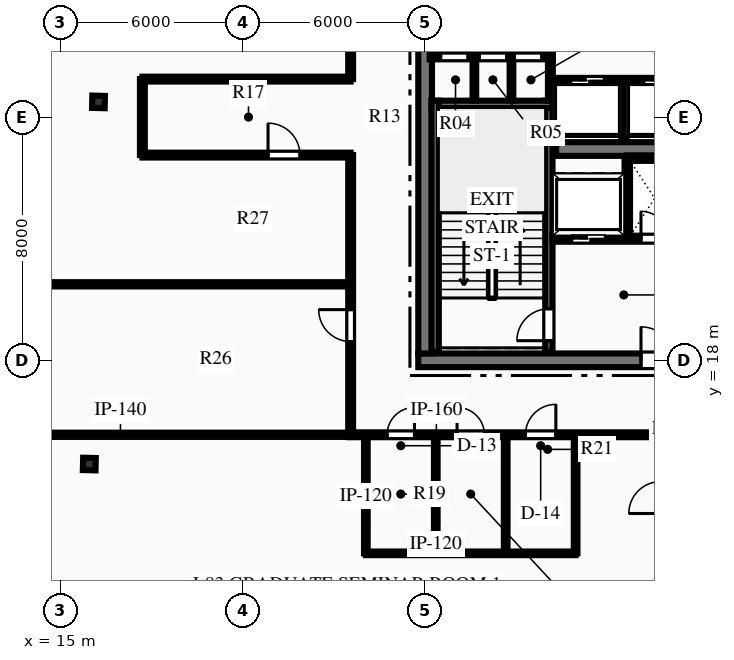
"""IFC4 building model, lengths in metres.
Left out: names, types, materials, properties, quantities, classifications, styles, units other than length and angle.
Written with IfcOpenShell. Run it as: python <this file> out.ifc"""

import sys

from ifc_helpers import new_model, si_unit, direction, frame, frame_2d, origin, origin_2d, place, context, subcontext, project, spatial, rectangle, i_section, extrude, element, fill, save


model = new_model("IFC4")
c1 = context("Model", 3, precision=1e-05, world=origin(), true_north=direction((0.0, 1.0)))
c2 = subcontext(c1, "Body", "Model", "MODEL_VIEW")
j1 = project(units=[si_unit("LENGTHUNIT", "METRE"), si_unit("PLANEANGLEUNIT", "RADIAN")], contexts=[c1])
p1 = place(None, origin())
s1 = spatial("IfcSite", under=j1, at=p1, CompositionType="ELEMENT")
p2 = place(p1, origin())
s2 = spatial("IfcBuilding", under=s1, at=p2, CompositionType="ELEMENT")
p3 = place(p2, frame((0.0, 0.0, 328.95)))
s3 = spatial("IfcBuildingStorey", under=s2, at=p3, CompositionType="ELEMENT", Elevation=328.95)
p4 = place(p3, frame((26.775, 18.0, 0.0), z_axis=(0.0, 0.0, 1.0), x_axis=(1.0, 0.0, 0.0)))
e1 = element("IfcWall", 1, at=p4, inside=s3, PredefinedType="SHEAR", context=c2, shape_type="SweptSolid", body=[
    extrude(rectangle(XDim=18.45, YDim=0.45, at=frame_2d((9.225, 0.0))), origin(), (0.0, 0.0, 1.0), 3.75),
])
p5 = place(p4, frame((7.325, 0.0, 0.0)))
e2 = element("IfcOpeningElement", 2, at=p5, cuts=e1, PredefinedType="OPENING", context=c2, shape_type="SweptSolid", body=[
    extrude(rectangle(XDim=1.1, YDim=2.15, at=frame_2d((0.55, 1.075))), frame((0.0, 0.235, 0.0), z_axis=(0.0, -1.0, 0.0), x_axis=(1.0, 0.0, 0.0)), (0.0, 0.0, 1.0), 0.47),
])
p6 = place(p4, frame((10.025, 0.0, 0.0)))
e3 = element("IfcOpeningElement", 3, at=p6, cuts=e1, PredefinedType="OPENING", context=c2, shape_type="SweptSolid", body=[
    extrude(rectangle(XDim=1.1, YDim=2.15, at=frame_2d((0.55, 1.075))), frame((0.0, 0.235, 0.0), z_axis=(0.0, -1.0, 0.0), x_axis=(1.0, 0.0, 0.0)), (0.0, 0.0, 1.0), 0.47),
])
p7 = place(p3, frame((27.0, 18.225, 0.0), z_axis=(0.0, 0.0, 1.0), x_axis=(0.0, 1.0, 0.0)))
e4 = element("IfcWall", 4, at=p7, inside=s3, PredefinedType="SHEAR", context=c2, shape_type="SweptSolid", body=[
    extrude(rectangle(XDim=15.55, YDim=0.45, at=frame_2d((7.775, 0.0))), origin(), (0.0, 0.0, 1.0), 3.75),
])
p8 = place(p7, frame((10.015, 0.0, 0.0)))
e5 = element("IfcOpeningElement", 5, at=p8, cuts=e4, PredefinedType="OPENING", context=c2, shape_type="SweptSolid", body=[
    extrude(rectangle(XDim=1.4, YDim=2.2, at=frame_2d((0.7, 1.1))), frame((0.0, 0.235, 0.0), z_axis=(0.0, -1.0, 0.0), x_axis=(1.0, 0.0, 0.0)), (0.0, 0.0, 1.0), 0.47),
])
p9 = place(p3, frame((31.31, 24.95, 0.0), z_axis=(0.0, 0.0, 1.0), x_axis=(1.0, 0.0, 0.0)))
e6 = element("IfcWall", 6, at=p9, inside=s3, PredefinedType="SHEAR", context=c2, shape_type="SweptSolid", body=[
    extrude(rectangle(XDim=9.38, YDim=0.45, at=frame_2d((4.69, 0.0))), origin(), (0.0, 0.0, 1.0), 3.75),
])
p10 = place(p3, frame((31.07, 18.28, 0.0), z_axis=(0.0, 0.0, 1.0), x_axis=(0.0, 1.0, 0.0)))
e7 = element("IfcWall", 7, at=p10, inside=s3, PredefinedType="SHEAR", context=c2, shape_type="SweptSolid", body=[
    extrude(rectangle(XDim=8.26, YDim=0.24, at=frame_2d((4.13, 0.0))), origin(), (0.0, 0.0, 1.0), 3.75),
])
p11 = place(p10, frame((0.365, 0.0, 0.0)))
e8 = element("IfcOpeningElement", 8, at=p11, cuts=e7, PredefinedType="OPENING", context=c2, shape_type="SweptSolid", body=[
    extrude(rectangle(XDim=1.05, YDim=2.15, at=frame_2d((0.525, 1.075))), frame((0.0, 0.13, 0.0), z_axis=(0.0, -1.0, 0.0), x_axis=(1.0, 0.0, 0.0)), (0.0, 0.0, 1.0), 0.26),
])
p12 = place(p3, frame((27.21, 26.42, 0.0), z_axis=(0.0, 0.0, 1.0), x_axis=(1.0, 0.0, 0.0)))
e9 = element("IfcWall", 9, at=p12, inside=s3, PredefinedType="SHEAR", context=c2, shape_type="SweptSolid", body=[
    extrude(rectangle(XDim=3.98, YDim=0.24, at=frame_2d((1.99, 0.0))), origin(), (0.0, 0.0, 1.0), 3.75),
])
p13 = place(p3, frame((27.33, 18.28, 0.0), z_axis=(0.0, 0.0, 1.0), x_axis=(0.0, 1.0, 0.0)))
e10 = element("IfcWall", 10, at=p13, inside=s3, PredefinedType="SHEAR", context=c2, shape_type="SweptSolid", body=[
    extrude(rectangle(XDim=8.26, YDim=0.24, at=frame_2d((4.13, 0.0))), origin(), (0.0, 0.0, 1.0), 3.75),
])
for number, where, z_axis, x_axis in (
    (11, (16.256, 26.5, 0.0), (0.0, 0.0, 1.0), (0.025, 1.0, 0.0)),
    (12, (15.955, 14.588, 0.0), (0.0, 0.0, 1.0), (0.025, 1.0, 0.0)),
):
    element("IfcColumn", number, at=place(p3, frame(where, z_axis=z_axis, x_axis=x_axis)), inside=s3, PredefinedType="COLUMN", context=c2, shape_type="SweptSolid", body=[
        extrude(i_section(OverallWidth=0.406, OverallDepth=0.416, WebThickness=0.03, FlangeThickness=0.048, at=origin_2d()), origin(), (0.0, 0.0, 1.0), 3.75),
    ])
p14 = place(p3, frame((31.19, 22.0, 0.0), z_axis=(0.0, 0.0, 1.0), x_axis=(1.0, 0.0, 0.0)))
e13 = element("IfcWall", 13, at=p14, inside=s3, PredefinedType="PARTITIONING", context=c2, shape_type="SweptSolid", body=[
    extrude(rectangle(XDim=4.69, YDim=0.2, at=frame_2d((2.345, 0.0))), origin(), (0.0, 0.0, 1.0), 3.49),
])
p15 = place(p14, frame((2.91, 0.0, 0.0)))
e14 = element("IfcOpeningElement", 14, at=p15, cuts=e13, PredefinedType="OPENING", context=c2, shape_type="SweptSolid", body=[
    extrude(rectangle(XDim=0.9, YDim=2.15, at=frame_2d((0.45, 1.075))), frame((0.0, 0.11, 0.0), z_axis=(0.0, -1.0, 0.0), x_axis=(1.0, 0.0, 0.0)), (0.0, 0.0, 1.0), 0.22),
])
p16 = place(p14, frame((0.635, 0.0, 0.0)))
e15 = element("IfcOpeningElement", 15, at=p16, cuts=e13, PredefinedType="OPENING", context=c2, shape_type="SweptSolid", body=[
    extrude(rectangle(XDim=1.1, YDim=2.15, at=frame_2d((0.55, 1.075))), frame((0.0, 0.11, 0.0), z_axis=(0.0, -1.0, 0.0), x_axis=(1.0, 0.0, 0.0)), (0.0, 0.0, 1.0), 0.22),
])
p17 = place(p3, frame((33.65, 22.05, 0.0), z_axis=(0.0, 0.0, 1.0), x_axis=(0.0, 1.0, 0.0)))
e16 = element("IfcWall", 16, at=p17, inside=s3, PredefinedType="PARTITIONING", context=c2, shape_type="SweptSolid", body=[
    extrude(rectangle(XDim=2.6, YDim=0.18, at=frame_2d((1.3, 0.0))), origin(), (0.0, 0.0, 1.0), 3.49),
])
p18 = place(p3, frame((33.65, 24.65, 0.0), z_axis=(0.0, 0.0, 1.0), x_axis=(1.0, 0.0, 0.0)))
e17 = element("IfcWall", 17, at=p18, inside=s3, PredefinedType="PARTITIONING", context=c2, shape_type="SweptSolid", body=[
    extrude(rectangle(XDim=1.8, YDim=0.18, at=frame_2d((0.9, 0.0))), origin(), (0.0, 0.0, 1.0), 3.49),
])
p19 = place(p3, frame((27.15, 27.98, 0.0), z_axis=(0.0, 0.0, 1.0), x_axis=(1.0, 0.0, 0.0)))
e18 = element("IfcWall", 18, at=p19, inside=s3, PredefinedType="PARTITIONING", context=c2, shape_type="SweptSolid", body=[
    extrude(rectangle(XDim=4.05, YDim=0.16, at=frame_2d((2.025, 0.0))), origin(), (0.0, 0.0, 1.0), 3.49),
])
p20 = place(p19, frame((0.36, 0.0, 0.0)))
e19 = element("IfcOpeningElement", 19, at=p20, cuts=e18, PredefinedType="OPENING", context=c2, shape_type="SweptSolid", body=[
    extrude(rectangle(XDim=0.9, YDim=2.15, at=frame_2d((0.45, 1.075))), frame((0.0, 0.09, 0.0), z_axis=(0.0, -1.0, 0.0), x_axis=(1.0, 0.0, 0.0)), (0.0, 0.0, 1.0), 0.18),
])
p21 = place(p19, frame((1.63, 0.0, 0.0)))
e20 = element("IfcOpeningElement", 20, at=p21, cuts=e18, PredefinedType="OPENING", context=c2, shape_type="SweptSolid", body=[
    extrude(rectangle(XDim=0.9, YDim=2.15, at=frame_2d((0.45, 1.075))), frame((0.0, 0.09, 0.0), z_axis=(0.0, -1.0, 0.0), x_axis=(1.0, 0.0, 0.0)), (0.0, 0.0, 1.0), 0.18),
])
p22 = place(p19, frame((2.788, 0.0, 0.0)))
e21 = element("IfcOpeningElement", 21, at=p22, cuts=e18, PredefinedType="OPENING", context=c2, shape_type="SweptSolid", body=[
    extrude(rectangle(XDim=0.9, YDim=2.15, at=frame_2d((0.45, 1.075))), frame((0.0, 0.09, 0.0), z_axis=(0.0, -1.0, 0.0), x_axis=(1.0, 0.0, 0.0)), (0.0, 0.0, 1.0), 0.18),
])
p23 = place(p3, frame((31.12, 26.54, 0.0), z_axis=(0.0, 0.0, 1.0), x_axis=(0.0, 1.0, 0.0)))
e22 = element("IfcWall", 22, at=p23, inside=s3, PredefinedType="PARTITIONING", context=c2, shape_type="SweptSolid", body=[
    extrude(rectangle(XDim=1.51, YDim=0.16, at=frame_2d((0.755, 0.0))), origin(), (0.0, 0.0, 1.0), 3.49),
])
for number, where, z_axis, x_axis in (
    (23, (28.62, 26.54, 0.0), (0.0, 0.0, 1.0), (0.0, 1.0, 0.0)),
    (24, (29.84, 26.54, 0.0), (0.0, 0.0, 1.0), (0.0, 1.0, 0.0)),
):
    element("IfcWall", number, at=place(p3, frame(where, z_axis=z_axis, x_axis=x_axis)), inside=s3, PredefinedType="PARTITIONING", context=c2, shape_type="SweptSolid", body=[
        extrude(rectangle(XDim=1.44, YDim=0.12, at=frame_2d((0.72, 0.0))), origin(), (0.0, 0.0, 1.0), 3.49),
    ])
p24 = place(p3, frame((31.2, 27.2, 0.0), z_axis=(0.0, 0.0, 1.0), x_axis=(1.0, 0.0, 0.0)))
e25 = element("IfcWall", 25, at=p24, inside=s3, PredefinedType="PARTITIONING", context=c2, shape_type="SweptSolid", body=[
    extrude(rectangle(XDim=9.6, YDim=0.18, at=frame_2d((4.8, 0.0))), origin(), (0.0, 0.0, 1.0), 3.49),
])
p25 = place(p24, frame((0.59, 0.0, 0.0)))
e26 = element("IfcOpeningElement", 26, at=p25, cuts=e25, PredefinedType="OPENING", context=c2, shape_type="SweptSolid", body=[
    extrude(rectangle(XDim=1.1, YDim=2.15, at=frame_2d((0.55, 1.075))), frame((0.0, 0.1, 0.0), z_axis=(0.0, -1.0, 0.0), x_axis=(1.0, 0.0, 0.0)), (0.0, 0.0, 1.0), 0.2),
])
p26 = place(p24, frame((2.99, 0.0, 0.0)))
e27 = element("IfcOpeningElement", 27, at=p26, cuts=e25, PredefinedType="OPENING", context=c2, shape_type="SweptSolid", body=[
    extrude(rectangle(XDim=1.1, YDim=2.15, at=frame_2d((0.55, 1.075))), frame((0.0, 0.1, 0.0), z_axis=(0.0, -1.0, 0.0), x_axis=(1.0, 0.0, 0.0)), (0.0, 0.0, 1.0), 0.2),
])
p27 = place(p24, frame((5.51, 0.0, 0.0)))
e28 = element("IfcOpeningElement", 28, at=p27, cuts=e25, PredefinedType="OPENING", context=c2, shape_type="SweptSolid", body=[
    extrude(rectangle(XDim=1.1, YDim=2.15, at=frame_2d((0.55, 1.075))), frame((0.0, 0.1, 0.0), z_axis=(0.0, -1.0, 0.0), x_axis=(1.0, 0.0, 0.0)), (0.0, 0.0, 1.0), 0.2),
])
p28 = place(p24, frame((7.91, 0.0, 0.0)))
e29 = element("IfcOpeningElement", 29, at=p28, cuts=e25, PredefinedType="OPENING", context=c2, shape_type="SweptSolid", body=[
    extrude(rectangle(XDim=1.1, YDim=2.15, at=frame_2d((0.55, 1.075))), frame((0.0, 0.1, 0.0), z_axis=(0.0, -1.0, 0.0), x_axis=(1.0, 0.0, 0.0)), (0.0, 0.0, 1.0), 0.2),
])
p29 = place(p3, frame((33.54, 25.3, 0.0), z_axis=(0.0, 0.0, 1.0), x_axis=(0.0, 1.0, 0.0)))
e30 = element("IfcWall", 30, at=p29, inside=s3, PredefinedType="PARTITIONING", context=c2, shape_type="SweptSolid", body=[
    extrude(rectangle(XDim=1.9, YDim=0.18, at=frame_2d((0.95, 0.0))), origin(), (0.0, 0.0, 1.0), 3.49),
])
p30 = place(p3, frame((24.5, 15.55, 0.0), z_axis=(0.0, 0.0, 1.0), x_axis=(1.0, 0.0, 0.0)))
e31 = element("IfcWall", 31, at=p30, inside=s3, PredefinedType="PARTITIONING", context=c2, shape_type="SweptSolid", body=[
    extrude(rectangle(XDim=10.25, YDim=0.16, at=frame_2d((5.125, 0.0))), origin(), (0.0, 0.0, 1.0), 3.49),
])
p31 = place(p30, frame((1.25, 0.0, 0.0)))
e32 = element("IfcOpeningElement", 32, at=p31, cuts=e31, PredefinedType="OPENING", context=c2, shape_type="SweptSolid", body=[
    extrude(rectangle(XDim=0.9, YDim=2.15, at=frame_2d((0.45, 1.075))), frame((0.0, 0.09, 0.0), z_axis=(0.0, -1.0, 0.0), x_axis=(1.0, 0.0, 0.0)), (0.0, 0.0, 1.0), 0.18),
])
p32 = place(p30, frame((3.55, 0.0, 0.0)))
e33 = element("IfcOpeningElement", 33, at=p32, cuts=e31, PredefinedType="OPENING", context=c2, shape_type="SweptSolid", body=[
    extrude(rectangle(XDim=0.9, YDim=2.15, at=frame_2d((0.45, 1.075))), frame((0.0, 0.09, 0.0), z_axis=(0.0, -1.0, 0.0), x_axis=(1.0, 0.0, 0.0)), (0.0, 0.0, 1.0), 0.18),
])
p33 = place(p30, frame((5.8, 0.0, 0.0)))
e34 = element("IfcOpeningElement", 34, at=p33, cuts=e31, PredefinedType="OPENING", context=c2, shape_type="SweptSolid", body=[
    extrude(rectangle(XDim=1.0, YDim=2.15, at=frame_2d((0.5, 1.075))), frame((0.0, 0.09, 0.0), z_axis=(0.0, -1.0, 0.0), x_axis=(1.0, 0.0, 0.0)), (0.0, 0.0, 1.0), 0.18),
])
p34 = place(p3, frame((24.55, 15.55, 0.0), z_axis=(0.0, 0.0, 1.0), x_axis=(0.0, 1.0, 0.0)))
e35 = element("IfcWall", 35, at=p34, inside=s3, PredefinedType="PARTITIONING", context=c2, shape_type="SweptSolid", body=[
    extrude(rectangle(XDim=9.2, YDim=0.16, at=frame_2d((4.6, 0.0))), origin(), (0.0, 0.0, 1.0), 3.49),
])
p35 = place(p34, frame((3.067, 0.0, 0.0)))
e36 = element("IfcOpeningElement", 36, at=p35, cuts=e35, PredefinedType="OPENING", context=c2, shape_type="SweptSolid", body=[
    extrude(rectangle(XDim=1.05, YDim=2.15, at=frame_2d((0.525, 1.075))), frame((0.0, 0.09, 0.0), z_axis=(0.0, -1.0, 0.0), x_axis=(1.0, 0.0, 0.0)), (0.0, 0.0, 1.0), 0.18),
])
p36 = place(p3, frame((24.55, 27.25, 0.0), z_axis=(0.0, 0.0, 1.0), x_axis=(0.0, 1.0, 0.0)))
e37 = element("IfcWall", 37, at=p36, inside=s3, PredefinedType="PARTITIONING", context=c2, shape_type="SweptSolid", body=[
    extrude(rectangle(XDim=9.2, YDim=0.16, at=frame_2d((4.6, 0.0))), origin(), (0.0, 0.0, 1.0), 3.49),
])
p37 = place(p36, frame((4.346, 0.0, 0.0)))
e38 = element("IfcOpeningElement", 38, at=p37, cuts=e37, PredefinedType="OPENING", context=c2, shape_type="SweptSolid", body=[
    extrude(rectangle(XDim=1.05, YDim=2.15, at=frame_2d((0.525, 1.075))), frame((0.0, 0.09, 0.0), z_axis=(0.0, -1.0, 0.0), x_axis=(1.0, 0.0, 0.0)), (0.0, 0.0, 1.0), 0.18),
])
p38 = place(p3, frame((17.7, 24.75, 0.0), z_axis=(0.0, 0.0, 1.0), x_axis=(1.0, 0.0, 0.0)))
e39 = element("IfcWall", 39, at=p38, inside=s3, PredefinedType="PARTITIONING", context=c2, shape_type="SweptSolid", body=[
    extrude(rectangle(XDim=6.85, YDim=0.16, at=frame_2d((3.425, 0.0))), origin(), (0.0, 0.0, 1.0), 3.49),
])
p39 = place(p38, frame((4.133, 0.0, 0.0)))
e40 = element("IfcOpeningElement", 40, at=p39, cuts=e39, PredefinedType="OPENING", context=c2, shape_type="SweptSolid", body=[
    extrude(rectangle(XDim=1.05, YDim=2.15, at=frame_2d((0.525, 1.075))), frame((0.0, 0.09, 0.0), z_axis=(0.0, -1.0, 0.0), x_axis=(1.0, 0.0, 0.0)), (0.0, 0.0, 1.0), 0.18),
])
p40 = place(p3, frame((17.7, 27.25, 0.0), z_axis=(0.0, 0.0, 1.0), x_axis=(1.0, 0.0, 0.0)))
e41 = element("IfcWall", 41, at=p40, inside=s3, PredefinedType="PARTITIONING", context=c2, shape_type="SweptSolid", body=[
    extrude(rectangle(XDim=6.85, YDim=0.16, at=frame_2d((3.425, 0.0))), origin(), (0.0, 0.0, 1.0), 3.49),
])
p41 = place(p3, frame((17.7, 24.75, 0.0), z_axis=(0.0, 0.0, 1.0), x_axis=(0.0, 1.0, 0.0)))
e42 = element("IfcWall", 42, at=p41, inside=s3, PredefinedType="PARTITIONING", context=c2, shape_type="SweptSolid", body=[
    extrude(rectangle(XDim=2.5, YDim=0.16, at=frame_2d((1.25, 0.0))), origin(), (0.0, 0.0, 1.0), 3.49),
])
p42 = place(p3, frame((25.05, 11.65, 0.0), z_axis=(0.0, 0.0, 1.0), x_axis=(0.0, 1.0, 0.0)))
e43 = element("IfcWall", 43, at=p42, inside=s3, PredefinedType="PARTITIONING", context=c2, shape_type="SweptSolid", body=[
    extrude(rectangle(XDim=3.9, YDim=0.12, at=frame_2d((1.95, 0.0))), origin(), (0.0, 0.0, 1.0), 2.868),
])
for number, where, z_axis, x_axis in (
    (44, (27.35, 11.65, 0.0), (0.0, 0.0, 1.0), (0.0, 1.0, 0.0)),
    (45, (29.65, 11.65, 0.0), (0.0, 0.0, 1.0), (0.0, 1.0, 0.0)),
    (46, (31.95, 11.65, 0.0), (0.0, 0.0, 1.0), (0.0, 1.0, 0.0)),
):
    element("IfcWall", number, at=place(p3, frame(where, z_axis=z_axis, x_axis=x_axis)), inside=s3, PredefinedType="PARTITIONING", context=c2, shape_type="SweptSolid", body=[
        extrude(rectangle(XDim=3.9, YDim=0.12, at=frame_2d((1.95, 0.0))), origin(), (0.0, 0.0, 1.0), 3.49),
    ])
p43 = place(p3, frame((25.05, 11.65, 0.0), z_axis=(0.0, 0.0, 1.0), x_axis=(1.0, 0.0, 0.0)))
e47 = element("IfcWall", 47, at=p43, inside=s3, PredefinedType="PARTITIONING", context=c2, shape_type="SweptSolid", body=[
    extrude(rectangle(XDim=6.9, YDim=0.12, at=frame_2d((3.45, 0.0))), origin(), (0.0, 0.0, 1.0), 3.49),
])
p44 = place(p3, frame((14.035, 15.55, 0.0), z_axis=(0.0, 0.0, 1.0), x_axis=(1.0, 0.0, 0.0)))
e48 = element("IfcWall", 48, at=p44, inside=s3, PredefinedType="PARTITIONING", context=c2, shape_type="SweptSolid", body=[
    extrude(rectangle(XDim=10.515, YDim=0.14, at=frame_2d((5.258, 0.0))), origin(), (0.0, 0.0, 1.0), 2.868),
])
p45 = place(p3, frame((14.061, 20.5, 0.0), z_axis=(0.0, 0.0, 1.0), x_axis=(1.0, 0.0, 0.0)))
e49 = element("IfcWall", 49, at=p45, inside=s3, PredefinedType="PARTITIONING", context=c2, shape_type="SweptSolid", body=[
    extrude(rectangle(XDim=10.489, YDim=0.14, at=frame_2d((5.245, 0.0))), origin(), (0.0, 0.0, 1.0), 3.49),
])
p46 = place(p20, origin())
e50 = element("IfcDoor", 50, at=p46, inside=s3, OperationType="SINGLE_SWING_LEFT", PredefinedType="DOOR", context=c2, shape_type="SweptSolid", body=[
    extrude(rectangle(XDim=0.9, YDim=2.15, at=frame_2d((0.45, 1.075))), frame((0.0, 0.025, 0.0), z_axis=(0.0, -1.0, 0.0), x_axis=(1.0, 0.0, 0.0)), (0.0, 0.0, 1.0), 0.05),
])
fill(e19, e50)
p47 = place(p21, origin())
e51 = element("IfcDoor", 51, at=p47, inside=s3, OperationType="SINGLE_SWING_RIGHT", PredefinedType="DOOR", context=c2, shape_type="SweptSolid", body=[
    extrude(rectangle(XDim=0.9, YDim=2.15, at=frame_2d((0.45, 1.075))), frame((0.0, 0.025, 0.0), z_axis=(0.0, -1.0, 0.0), x_axis=(1.0, 0.0, 0.0)), (0.0, 0.0, 1.0), 0.05),
])
fill(e20, e51)
p48 = place(p22, origin())
e52 = element("IfcDoor", 52, at=p48, inside=s3, OperationType="SINGLE_SWING_LEFT", PredefinedType="DOOR", context=c2, shape_type="SweptSolid", body=[
    extrude(rectangle(XDim=0.9, YDim=2.15, at=frame_2d((0.45, 1.075))), frame((0.0, 0.025, 0.0), z_axis=(0.0, -1.0, 0.0), x_axis=(1.0, 0.0, 0.0)), (0.0, 0.0, 1.0), 0.05),
])
fill(e21, e52)
p49 = place(p11, origin())
e53 = element("IfcDoor", 53, at=p49, inside=s3, OperationType="SINGLE_SWING_LEFT", PredefinedType="DOOR", context=c2, shape_type="SweptSolid", body=[
    extrude(rectangle(XDim=1.05, YDim=2.15, at=frame_2d((0.525, 1.075))), frame((0.0, 0.025, 0.0), z_axis=(0.0, -1.0, 0.0), x_axis=(1.0, 0.0, 0.0)), (0.0, 0.0, 1.0), 0.05),
])
fill(e8, e53)
p50 = place(p5, origin())
e54 = element("IfcDoor", 54, at=p50, inside=s3, OperationType="SINGLE_SWING_LEFT", PredefinedType="DOOR", context=c2, shape_type="SweptSolid", body=[
    extrude(rectangle(XDim=1.1, YDim=2.15, at=frame_2d((0.55, 1.075))), frame((0.0, 0.025, 0.0), z_axis=(0.0, -1.0, 0.0), x_axis=(1.0, 0.0, 0.0)), (0.0, 0.0, 1.0), 0.05),
])
fill(e2, e54)
p51 = place(p15, origin())
e55 = element("IfcDoor", 55, at=p51, inside=s3, OperationType="SINGLE_SWING_LEFT", PredefinedType="DOOR", context=c2, shape_type="SweptSolid", body=[
    extrude(rectangle(XDim=0.9, YDim=2.15, at=frame_2d((0.45, 1.075))), frame((0.0, 0.025, 0.0), z_axis=(0.0, -1.0, 0.0), x_axis=(1.0, 0.0, 0.0)), (0.0, 0.0, 1.0), 0.05),
])
fill(e14, e55)
p52 = place(p31, origin())
e56 = element("IfcDoor", 56, at=p52, inside=s3, OperationType="SINGLE_SWING_RIGHT", PredefinedType="DOOR", context=c2, shape_type="SweptSolid", body=[
    extrude(rectangle(XDim=0.9, YDim=2.15, at=frame_2d((0.45, 1.075))), frame((0.0, 0.025, 0.0), z_axis=(0.0, -1.0, 0.0), x_axis=(1.0, 0.0, 0.0)), (0.0, 0.0, 1.0), 0.05),
])
fill(e32, e56)
p53 = place(p32, origin())
e57 = element("IfcDoor", 57, at=p53, inside=s3, OperationType="SINGLE_SWING_LEFT", PredefinedType="DOOR", context=c2, shape_type="SweptSolid", body=[
    extrude(rectangle(XDim=0.9, YDim=2.15, at=frame_2d((0.45, 1.075))), frame((0.0, 0.025, 0.0), z_axis=(0.0, -1.0, 0.0), x_axis=(1.0, 0.0, 0.0)), (0.0, 0.0, 1.0), 0.05),
])
fill(e33, e57)
p54 = place(p33, origin())
e58 = element("IfcDoor", 58, at=p54, inside=s3, OperationType="SINGLE_SWING_RIGHT", PredefinedType="DOOR", context=c2, shape_type="SweptSolid", body=[
    extrude(rectangle(XDim=1.0, YDim=2.15, at=frame_2d((0.5, 1.075))), frame((0.0, 0.025, 0.0), z_axis=(0.0, -1.0, 0.0), x_axis=(1.0, 0.0, 0.0)), (0.0, 0.0, 1.0), 0.05),
])
fill(e34, e58)
p55 = place(p35, origin())
e59 = element("IfcDoor", 59, at=p55, inside=s3, OperationType="SINGLE_SWING_RIGHT", PredefinedType="DOOR", context=c2, shape_type="SweptSolid", body=[
    extrude(rectangle(XDim=1.05, YDim=2.15, at=frame_2d((0.525, 1.075))), frame((0.0, 0.025, 0.0), z_axis=(0.0, -1.0, 0.0), x_axis=(1.0, 0.0, 0.0)), (0.0, 0.0, 1.0), 0.05),
])
fill(e36, e59)
p56 = place(p39, origin())
e60 = element("IfcDoor", 60, at=p56, inside=s3, OperationType="SINGLE_SWING_LEFT", PredefinedType="DOOR", context=c2, shape_type="SweptSolid", body=[
    extrude(rectangle(XDim=1.05, YDim=2.15, at=frame_2d((0.525, 1.075))), frame((0.0, 0.025, 0.0), z_axis=(0.0, -1.0, 0.0), x_axis=(1.0, 0.0, 0.0)), (0.0, 0.0, 1.0), 0.05),
])
fill(e40, e60)
p57 = place(p25, origin())
e61 = element("IfcDoor", 61, at=p57, inside=s3, OperationType="SLIDING_TO_LEFT", PredefinedType="DOOR", context=c2, shape_type="SweptSolid", body=[
    extrude(rectangle(XDim=1.1, YDim=2.15, at=frame_2d((0.55, 1.075))), frame((0.0, 0.025, 0.0), z_axis=(0.0, -1.0, 0.0), x_axis=(1.0, 0.0, 0.0)), (0.0, 0.0, 1.0), 0.05),
])
fill(e26, e61)
p58 = place(p26, origin())
e62 = element("IfcDoor", 62, at=p58, inside=s3, OperationType="SLIDING_TO_LEFT", PredefinedType="DOOR", context=c2, shape_type="SweptSolid", body=[
    extrude(rectangle(XDim=1.1, YDim=2.15, at=frame_2d((0.55, 1.075))), frame((0.0, 0.025, 0.0), z_axis=(0.0, -1.0, 0.0), x_axis=(1.0, 0.0, 0.0)), (0.0, 0.0, 1.0), 0.05),
])
fill(e27, e62)
p59 = place(p16, origin())
e63 = element("IfcDoor", 63, at=p59, inside=s3, OperationType="SLIDING_TO_LEFT", PredefinedType="DOOR", context=c2, shape_type="SweptSolid", body=[
    extrude(rectangle(XDim=1.1, YDim=2.15, at=frame_2d((0.55, 1.075))), frame((0.0, 0.025, 0.0), z_axis=(0.0, -1.0, 0.0), x_axis=(1.0, 0.0, 0.0)), (0.0, 0.0, 1.0), 0.05),
])
fill(e15, e63)
save(model, sys.argv[1])
